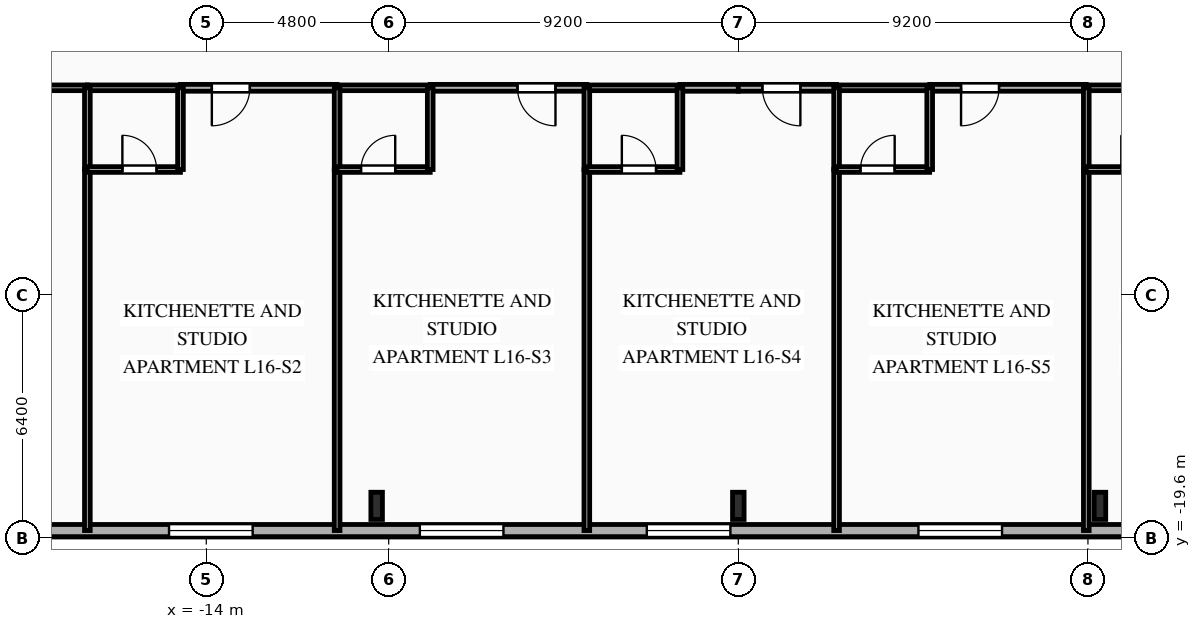
"""IFC4 building model, lengths in metres.
Left out: names, types, materials, properties, quantities, classifications, styles, units other than length and angle.
Written with IfcOpenShell. Run it as: python <this file> out.ifc"""

import sys

from ifc_helpers import new_model, si_unit, direction, frame, frame_2d, origin, origin_2d, place, context, subcontext, project, spatial, rectangle, i_section, extrude, element, fill, save


model = new_model("IFC4")
c1 = context("Model", 3, precision=1e-05, world=origin(), true_north=direction((0.0, 1.0)))
c2 = subcontext(c1, "Body", "Model", "MODEL_VIEW")
j1 = project(units=[si_unit("LENGTHUNIT", "METRE"), si_unit("PLANEANGLEUNIT", "RADIAN")], contexts=[c1])
p1 = place(None, origin())
s1 = spatial("IfcSite", under=j1, at=p1, CompositionType="ELEMENT")
p2 = place(p1, origin())
s2 = spatial("IfcBuilding", under=s1, at=p2, CompositionType="ELEMENT")
p3 = place(p2, frame((0.0, 0.0, 60.5)))
s3 = spatial("IfcBuildingStorey", under=s2, at=p3, CompositionType="ELEMENT", Elevation=60.5)
for number, where, z_axis, x_axis in (
    (1, (-9.517, -18.75, 0.0), (0.0, 0.0, 1.0), (1.0, 0.0, 0.0)),
    (2, (0.0, -18.75, 0.0), (0.0, 0.0, 1.0), (1.0, 0.0, 0.0)),
    (3, (9.517, -18.75, 0.0), (0.0, 0.0, 1.0), (1.0, 0.0, 0.0)),
):
    element("IfcColumn", number, at=place(p3, frame(where, z_axis=z_axis, x_axis=x_axis)), inside=s3, PredefinedType="COLUMN", context=c2, shape_type="SweptSolid", body=[
        extrude(i_section(OverallWidth=0.304, OverallDepth=0.716, WebThickness=0.021, FlangeThickness=0.04, FilletRadius=0.027, at=origin_2d()), origin(), (0.0, 0.0, 1.0), 3.35),
    ])
p4 = place(p3, frame((29.2, -19.4, 0.0), z_axis=(0.0, 0.0, 1.0), x_axis=(-1.0, 0.0, 0.0)))
e4 = element("IfcWall", 4, at=p4, inside=s3, PredefinedType="SOLIDWALL", context=c2, shape_type="SweptSolid", body=[
    extrude(rectangle(XDim=58.4, YDim=0.32, at=frame_2d((29.2, 0.0))), origin(), (0.0, 0.0, 1.0), 3.035),
])
p5 = place(p4, frame((7.215, 0.0, 0.85)))
e5 = element("IfcOpeningElement", 5, at=p5, cuts=e4, PredefinedType="OPENING", context=c2, shape_type="SweptSolid", body=[
    extrude(rectangle(XDim=1.65, YDim=1.85, at=frame_2d((0.825, 0.925))), frame((0.0, 0.17, 0.0), z_axis=(0.0, -1.0, 0.0), x_axis=(1.0, 0.0, 0.0)), (0.0, 0.0, 1.0), 0.34),
])
p6 = place(p4, frame((10.855, 0.0, 0.85)))
e6 = element("IfcOpeningElement", 6, at=p6, cuts=e4, PredefinedType="OPENING", context=c2, shape_type="SweptSolid", body=[
    extrude(rectangle(XDim=1.65, YDim=1.85, at=frame_2d((0.825, 0.925))), frame((0.0, 0.17, 0.0), z_axis=(0.0, -1.0, 0.0), x_axis=(1.0, 0.0, 0.0)), (0.0, 0.0, 1.0), 0.34),
])
p7 = place(p4, frame((15.7, 0.0, 0.85)))
e7 = element("IfcOpeningElement", 7, at=p7, cuts=e4, PredefinedType="OPENING", context=c2, shape_type="SweptSolid", body=[
    extrude(rectangle(XDim=2.2, YDim=1.85, at=frame_2d((1.1, 0.925))), frame((0.0, 0.17, 0.0), z_axis=(0.0, -1.0, 0.0), x_axis=(1.0, 0.0, 0.0)), (0.0, 0.0, 1.0), 0.34),
])
p8 = place(p4, frame((22.26, 0.0, 0.85)))
e8 = element("IfcOpeningElement", 8, at=p8, cuts=e4, PredefinedType="OPENING", context=c2, shape_type="SweptSolid", body=[
    extrude(rectangle(XDim=2.2, YDim=1.85, at=frame_2d((1.1, 0.925))), frame((0.0, 0.17, 0.0), z_axis=(0.0, -1.0, 0.0), x_axis=(1.0, 0.0, 0.0)), (0.0, 0.0, 1.0), 0.34),
])
p9 = place(p4, frame((29.408, 0.0, 0.85)))
e9 = element("IfcOpeningElement", 9, at=p9, cuts=e4, PredefinedType="OPENING", context=c2, shape_type="SweptSolid", body=[
    extrude(rectangle(XDim=2.2, YDim=1.85, at=frame_2d((1.1, 0.925))), frame((0.0, 0.17, 0.0), z_axis=(0.0, -1.0, 0.0), x_axis=(1.0, 0.0, 0.0)), (0.0, 0.0, 1.0), 0.34),
])
p10 = place(p4, frame((35.38, 0.0, 0.85)))
e10 = element("IfcOpeningElement", 10, at=p10, cuts=e4, PredefinedType="OPENING", context=c2, shape_type="SweptSolid", body=[
    extrude(rectangle(XDim=2.2, YDim=1.85, at=frame_2d((1.1, 0.925))), frame((0.0, 0.17, 0.0), z_axis=(0.0, -1.0, 0.0), x_axis=(1.0, 0.0, 0.0)), (0.0, 0.0, 1.0), 0.34),
])
p11 = place(p4, frame((41.98, 0.0, 0.85)))
e11 = element("IfcOpeningElement", 11, at=p11, cuts=e4, PredefinedType="OPENING", context=c2, shape_type="SweptSolid", body=[
    extrude(rectangle(XDim=2.2, YDim=1.85, at=frame_2d((1.1, 0.925))), frame((0.0, 0.17, 0.0), z_axis=(0.0, -1.0, 0.0), x_axis=(1.0, 0.0, 0.0)), (0.0, 0.0, 1.0), 0.34),
])
p12 = place(p4, frame((48.495, 0.0, 0.85)))
e12 = element("IfcOpeningElement", 12, at=p12, cuts=e4, PredefinedType="OPENING", context=c2, shape_type="SweptSolid", body=[
    extrude(rectangle(XDim=1.65, YDim=1.85, at=frame_2d((0.825, 0.925))), frame((0.0, 0.17, 0.0), z_axis=(0.0, -1.0, 0.0), x_axis=(1.0, 0.0, 0.0)), (0.0, 0.0, 1.0), 0.34),
])
p13 = place(p3, frame((-17.129, -7.75, 0.0), z_axis=(0.0, 0.0, 1.0), x_axis=(-1.0, 0.0, 0.0)))
e13 = element("IfcWall", 13, at=p13, inside=s3, PredefinedType="PARTITIONING", context=c2, shape_type="SweptSolid", body=[
    extrude(rectangle(XDim=5.871, YDim=0.15, at=frame_2d((2.936, 0.0))), origin(), (0.0, 0.0, 1.0), 3.035),
])
p14 = place(p13, frame((3.783, 0.0, 0.0)))
e14 = element("IfcOpeningElement", 14, at=p14, cuts=e13, PredefinedType="OPENING", context=c2, shape_type="SweptSolid", body=[
    extrude(rectangle(XDim=1.05, YDim=2.15, at=frame_2d((0.525, 1.075))), frame((0.0, 0.085, 0.0), z_axis=(0.0, -1.0, 0.0), x_axis=(1.0, 0.0, 0.0)), (0.0, 0.0, 1.0), 0.17),
])
p15 = place(p3, frame((-10.557, -7.75, 0.0), z_axis=(0.0, 0.0, 1.0), x_axis=(-1.0, 0.0, 0.0)))
e15 = element("IfcWall", 15, at=p15, inside=s3, PredefinedType="PARTITIONING", context=c2, shape_type="SweptSolid", body=[
    extrude(rectangle(XDim=4.122, YDim=0.18, at=frame_2d((2.061, 0.0))), origin(), (0.0, 0.0, 1.0), 3.035),
])
p16 = place(p15, frame((2.297, 0.0, 0.0)))
e16 = element("IfcOpeningElement", 16, at=p16, cuts=e15, PredefinedType="OPENING", context=c2, shape_type="SweptSolid", body=[
    extrude(rectangle(XDim=1.0, YDim=2.15, at=frame_2d((0.5, 1.075))), frame((0.0, 0.1, 0.0), z_axis=(0.0, -1.0, 0.0), x_axis=(1.0, 0.0, 0.0)), (0.0, 0.0, 1.0), 0.2),
])
p17 = place(p3, frame((-14.679, -7.75, 0.0), z_axis=(0.0, 0.0, 1.0), x_axis=(-1.0, 0.0, 0.0)))
e17 = element("IfcWall", 17, at=p17, inside=s3, PredefinedType="PLUMBINGWALL", context=c2, shape_type="SweptSolid", body=[
    extrude(rectangle(XDim=2.45, YDim=0.15, at=frame_2d((1.225, 0.0))), origin(), (0.0, 0.0, 1.0), 3.035),
])
p18 = place(p3, frame((-3.986, -7.75, 0.0), z_axis=(0.0, 0.0, 1.0), x_axis=(-1.0, 0.0, 0.0)))
e18 = element("IfcWall", 18, at=p18, inside=s3, PredefinedType="PARTITIONING", context=c2, shape_type="SweptSolid", body=[
    extrude(rectangle(XDim=4.121, YDim=0.18, at=frame_2d((2.061, 0.0))), origin(), (0.0, 0.0, 1.0), 3.035),
])
p19 = place(p18, frame((0.825, 0.0, 0.0)))
e19 = element("IfcOpeningElement", 19, at=p19, cuts=e18, PredefinedType="OPENING", context=c2, shape_type="SweptSolid", body=[
    extrude(rectangle(XDim=1.0, YDim=2.15, at=frame_2d((0.5, 1.075))), frame((0.0, 0.1, 0.0), z_axis=(0.0, -1.0, 0.0), x_axis=(1.0, 0.0, 0.0)), (0.0, 0.0, 1.0), 0.2),
])
p20 = place(p3, frame((-8.107, -7.75, 0.0), z_axis=(0.0, 0.0, 1.0), x_axis=(-1.0, 0.0, 0.0)))
e20 = element("IfcWall", 20, at=p20, inside=s3, PredefinedType="PLUMBINGWALL", context=c2, shape_type="SweptSolid", body=[
    extrude(rectangle(XDim=2.45, YDim=0.15, at=frame_2d((1.225, 0.0))), origin(), (0.0, 0.0, 1.0), 3.035),
])
p21 = place(p3, frame((0.0, -7.75, 0.0), z_axis=(0.0, 0.0, 1.0), x_axis=(-1.0, 0.0, 0.0)))
e21 = element("IfcWall", 21, at=p21, inside=s3, PredefinedType="PARTITIONING", context=c2, shape_type="SweptSolid", body=[
    extrude(rectangle(XDim=1.536, YDim=0.18, at=frame_2d((0.768, 0.0))), origin(), (0.0, 0.0, 1.0), 3.035),
])
p22 = place(p3, frame((-1.536, -7.75, 0.0), z_axis=(0.0, 0.0, 1.0), x_axis=(-1.0, 0.0, 0.0)))
e22 = element("IfcWall", 22, at=p22, inside=s3, PredefinedType="PLUMBINGWALL", context=c2, shape_type="SweptSolid", body=[
    extrude(rectangle(XDim=2.45, YDim=0.15, at=frame_2d((1.225, 0.0))), origin(), (0.0, 0.0, 1.0), 3.035),
])
p23 = place(p3, frame((2.586, -7.75, 0.0), z_axis=(0.0, 0.0, 1.0), x_axis=(-1.0, 0.0, 0.0)))
e23 = element("IfcWall", 23, at=p23, inside=s3, PredefinedType="PARTITIONING", context=c2, shape_type="SweptSolid", body=[
    extrude(rectangle(XDim=2.586, YDim=0.18, at=frame_2d((1.293, 0.0))), origin(), (0.0, 0.0, 1.0), 3.035),
])
p24 = place(p23, frame((0.953, 0.0, 0.0)))
e24 = element("IfcOpeningElement", 24, at=p24, cuts=e23, PredefinedType="OPENING", context=c2, shape_type="SweptSolid", body=[
    extrude(rectangle(XDim=1.0, YDim=2.15, at=frame_2d((0.5, 1.075))), frame((0.0, 0.1, 0.0), z_axis=(0.0, -1.0, 0.0), x_axis=(1.0, 0.0, 0.0)), (0.0, 0.0, 1.0), 0.2),
])
p25 = place(p3, frame((9.157, -7.75, 0.0), z_axis=(0.0, 0.0, 1.0), x_axis=(-1.0, 0.0, 0.0)))
e25 = element("IfcWall", 25, at=p25, inside=s3, PredefinedType="PARTITIONING", context=c2, shape_type="SweptSolid", body=[
    extrude(rectangle(XDim=4.121, YDim=0.18, at=frame_2d((2.061, 0.0))), origin(), (0.0, 0.0, 1.0), 3.035),
])
p26 = place(p25, frame((2.296, 0.0, 0.0)))
e26 = element("IfcOpeningElement", 26, at=p26, cuts=e25, PredefinedType="OPENING", context=c2, shape_type="SweptSolid", body=[
    extrude(rectangle(XDim=1.0, YDim=2.15, at=frame_2d((0.5, 1.075))), frame((0.0, 0.1, 0.0), z_axis=(0.0, -1.0, 0.0), x_axis=(1.0, 0.0, 0.0)), (0.0, 0.0, 1.0), 0.2),
])
for number, where, z_axis, x_axis in (
    (27, (5.036, -7.75, 0.0), (0.0, 0.0, 1.0), (-1.0, 0.0, 0.0)),
    (28, (11.607, -7.75, 0.0), (0.0, 0.0, 1.0), (-1.0, 0.0, 0.0)),
):
    element("IfcWall", number, at=place(p3, frame(where, z_axis=z_axis, x_axis=x_axis)), inside=s3, PredefinedType="PLUMBINGWALL", context=c2, shape_type="SweptSolid", body=[
        extrude(rectangle(XDim=2.45, YDim=0.15, at=frame_2d((1.225, 0.0))), origin(), (0.0, 0.0, 1.0), 3.035),
    ])
p27 = place(p3, frame((-17.129, -9.9, 0.0), z_axis=(0.0, 0.0, 1.0), x_axis=(0.0, -1.0, 0.0)))
e29 = element("IfcWall", 29, at=p27, inside=s3, PredefinedType="PARTITIONING", context=c2, shape_type="SweptSolid", body=[
    extrude(rectangle(XDim=9.5, YDim=0.15, at=frame_2d((4.75, 0.0))), origin(), (0.0, 0.0, 1.0), 3.035),
])
p28 = place(p3, frame((-17.129, -7.75, 0.0), z_axis=(0.0, 0.0, 1.0), x_axis=(0.0, -1.0, 0.0)))
e30 = element("IfcWall", 30, at=p28, inside=s3, PredefinedType="PLUMBINGWALL", context=c2, shape_type="SweptSolid", body=[
    extrude(rectangle(XDim=2.15, YDim=0.15, at=frame_2d((1.075, 0.0))), origin(), (0.0, 0.0, 1.0), 3.035),
])
p29 = place(p3, frame((-17.129, -9.9, 0.0), z_axis=(0.0, 0.0, 1.0), x_axis=(1.0, 0.0, 0.0)))
e31 = element("IfcWall", 31, at=p29, inside=s3, PredefinedType="PLUMBINGWALL", context=c2, shape_type="SweptSolid", body=[
    extrude(rectangle(XDim=2.45, YDim=0.15, at=frame_2d((1.225, 0.0))), origin(), (0.0, 0.0, 1.0), 3.035),
])
p30 = place(p29, frame((0.921, 0.0, 0.0)))
e32 = element("IfcOpeningElement", 32, at=p30, cuts=e31, PredefinedType="OPENING", context=c2, shape_type="SweptSolid", body=[
    extrude(rectangle(XDim=0.9, YDim=2.1, at=frame_2d((0.45, 1.05))), frame((0.0, 0.085, 0.0), z_axis=(0.0, -1.0, 0.0), x_axis=(1.0, 0.0, 0.0)), (0.0, 0.0, 1.0), 0.17),
])
p31 = place(p3, frame((-14.679, -9.9, 0.0), z_axis=(0.0, 0.0, 1.0), x_axis=(0.0, 1.0, 0.0)))
e33 = element("IfcWall", 33, at=p31, inside=s3, PredefinedType="PLUMBINGWALL", context=c2, shape_type="SweptSolid", body=[
    extrude(rectangle(XDim=2.15, YDim=0.15, at=frame_2d((1.075, 0.0))), origin(), (0.0, 0.0, 1.0), 3.035),
])
p32 = place(p3, frame((-10.557, -9.9, 0.0), z_axis=(0.0, 0.0, 1.0), x_axis=(0.0, -1.0, 0.0)))
e34 = element("IfcWall", 34, at=p32, inside=s3, PredefinedType="PARTITIONING", context=c2, shape_type="SweptSolid", body=[
    extrude(rectangle(XDim=9.5, YDim=0.15, at=frame_2d((4.75, 0.0))), origin(), (0.0, 0.0, 1.0), 3.035),
])
p33 = place(p3, frame((-10.557, -7.75, 0.0), z_axis=(0.0, 0.0, 1.0), x_axis=(0.0, -1.0, 0.0)))
e35 = element("IfcWall", 35, at=p33, inside=s3, PredefinedType="PLUMBINGWALL", context=c2, shape_type="SweptSolid", body=[
    extrude(rectangle(XDim=2.15, YDim=0.15, at=frame_2d((1.075, 0.0))), origin(), (0.0, 0.0, 1.0), 3.035),
])
p34 = place(p3, frame((-10.557, -9.9, 0.0), z_axis=(0.0, 0.0, 1.0), x_axis=(1.0, 0.0, 0.0)))
e36 = element("IfcWall", 36, at=p34, inside=s3, PredefinedType="PLUMBINGWALL", context=c2, shape_type="SweptSolid", body=[
    extrude(rectangle(XDim=2.45, YDim=0.15, at=frame_2d((1.225, 0.0))), origin(), (0.0, 0.0, 1.0), 3.035),
])
p35 = place(p34, frame((0.629, 0.0, 0.0)))
e37 = element("IfcOpeningElement", 37, at=p35, cuts=e36, PredefinedType="OPENING", context=c2, shape_type="SweptSolid", body=[
    extrude(rectangle(XDim=0.9, YDim=2.1, at=frame_2d((0.45, 1.05))), frame((0.0, 0.085, 0.0), z_axis=(0.0, -1.0, 0.0), x_axis=(1.0, 0.0, 0.0)), (0.0, 0.0, 1.0), 0.17),
])
p36 = place(p3, frame((-8.107, -9.9, 0.0), z_axis=(0.0, 0.0, 1.0), x_axis=(0.0, 1.0, 0.0)))
e38 = element("IfcWall", 38, at=p36, inside=s3, PredefinedType="PLUMBINGWALL", context=c2, shape_type="SweptSolid", body=[
    extrude(rectangle(XDim=2.15, YDim=0.15, at=frame_2d((1.075, 0.0))), origin(), (0.0, 0.0, 1.0), 3.035),
])
p37 = place(p3, frame((-3.986, -9.9, 0.0), z_axis=(0.0, 0.0, 1.0), x_axis=(0.0, -1.0, 0.0)))
e39 = element("IfcWall", 39, at=p37, inside=s3, PredefinedType="PARTITIONING", context=c2, shape_type="SweptSolid", body=[
    extrude(rectangle(XDim=9.5, YDim=0.15, at=frame_2d((4.75, 0.0))), origin(), (0.0, 0.0, 1.0), 3.035),
])
p38 = place(p3, frame((-3.986, -7.75, 0.0), z_axis=(0.0, 0.0, 1.0), x_axis=(0.0, -1.0, 0.0)))
e40 = element("IfcWall", 40, at=p38, inside=s3, PredefinedType="PLUMBINGWALL", context=c2, shape_type="SweptSolid", body=[
    extrude(rectangle(XDim=2.15, YDim=0.15, at=frame_2d((1.075, 0.0))), origin(), (0.0, 0.0, 1.0), 3.035),
])
p39 = place(p3, frame((-3.986, -9.9, 0.0), z_axis=(0.0, 0.0, 1.0), x_axis=(1.0, 0.0, 0.0)))
e41 = element("IfcWall", 41, at=p39, inside=s3, PredefinedType="PLUMBINGWALL", context=c2, shape_type="SweptSolid", body=[
    extrude(rectangle(XDim=2.45, YDim=0.15, at=frame_2d((1.225, 0.0))), origin(), (0.0, 0.0, 1.0), 3.035),
])
p40 = place(p39, frame((0.921, 0.0, 0.0)))
e42 = element("IfcOpeningElement", 42, at=p40, cuts=e41, PredefinedType="OPENING", context=c2, shape_type="SweptSolid", body=[
    extrude(rectangle(XDim=0.9, YDim=2.1, at=frame_2d((0.45, 1.05))), frame((0.0, 0.085, 0.0), z_axis=(0.0, -1.0, 0.0), x_axis=(1.0, 0.0, 0.0)), (0.0, 0.0, 1.0), 0.17),
])
p41 = place(p3, frame((-1.536, -9.9, 0.0), z_axis=(0.0, 0.0, 1.0), x_axis=(0.0, 1.0, 0.0)))
e43 = element("IfcWall", 43, at=p41, inside=s3, PredefinedType="PLUMBINGWALL", context=c2, shape_type="SweptSolid", body=[
    extrude(rectangle(XDim=2.15, YDim=0.15, at=frame_2d((1.075, 0.0))), origin(), (0.0, 0.0, 1.0), 3.035),
])
p42 = place(p3, frame((2.586, -9.9, 0.0), z_axis=(0.0, 0.0, 1.0), x_axis=(0.0, -1.0, 0.0)))
e44 = element("IfcWall", 44, at=p42, inside=s3, PredefinedType="PARTITIONING", context=c2, shape_type="SweptSolid", body=[
    extrude(rectangle(XDim=9.5, YDim=0.15, at=frame_2d((4.75, 0.0))), origin(), (0.0, 0.0, 1.0), 3.035),
])
p43 = place(p3, frame((2.586, -7.75, 0.0), z_axis=(0.0, 0.0, 1.0), x_axis=(0.0, -1.0, 0.0)))
e45 = element("IfcWall", 45, at=p43, inside=s3, PredefinedType="PLUMBINGWALL", context=c2, shape_type="SweptSolid", body=[
    extrude(rectangle(XDim=2.15, YDim=0.15, at=frame_2d((1.075, 0.0))), origin(), (0.0, 0.0, 1.0), 3.035),
])
p44 = place(p3, frame((2.586, -9.9, 0.0), z_axis=(0.0, 0.0, 1.0), x_axis=(1.0, 0.0, 0.0)))
e46 = element("IfcWall", 46, at=p44, inside=s3, PredefinedType="PLUMBINGWALL", context=c2, shape_type="SweptSolid", body=[
    extrude(rectangle(XDim=2.45, YDim=0.15, at=frame_2d((1.225, 0.0))), origin(), (0.0, 0.0, 1.0), 3.035),
])
p45 = place(p44, frame((0.629, 0.0, 0.0)))
e47 = element("IfcOpeningElement", 47, at=p45, cuts=e46, PredefinedType="OPENING", context=c2, shape_type="SweptSolid", body=[
    extrude(rectangle(XDim=0.9, YDim=2.1, at=frame_2d((0.45, 1.05))), frame((0.0, 0.085, 0.0), z_axis=(0.0, -1.0, 0.0), x_axis=(1.0, 0.0, 0.0)), (0.0, 0.0, 1.0), 0.17),
])
p46 = place(p3, frame((5.036, -9.9, 0.0), z_axis=(0.0, 0.0, 1.0), x_axis=(0.0, 1.0, 0.0)))
e48 = element("IfcWall", 48, at=p46, inside=s3, PredefinedType="PLUMBINGWALL", context=c2, shape_type="SweptSolid", body=[
    extrude(rectangle(XDim=2.15, YDim=0.15, at=frame_2d((1.075, 0.0))), origin(), (0.0, 0.0, 1.0), 3.035),
])
p47 = place(p3, frame((9.157, -9.9, 0.0), z_axis=(0.0, 0.0, 1.0), x_axis=(0.0, -1.0, 0.0)))
e49 = element("IfcWall", 49, at=p47, inside=s3, PredefinedType="PARTITIONING", context=c2, shape_type="SweptSolid", body=[
    extrude(rectangle(XDim=9.5, YDim=0.15, at=frame_2d((4.75, 0.0))), origin(), (0.0, 0.0, 1.0), 2.52),
])
p48 = place(p3, frame((9.157, -7.75, 0.0), z_axis=(0.0, 0.0, 1.0), x_axis=(0.0, -1.0, 0.0)))
e50 = element("IfcWall", 50, at=p48, inside=s3, PredefinedType="PLUMBINGWALL", context=c2, shape_type="SweptSolid", body=[
    extrude(rectangle(XDim=2.15, YDim=0.15, at=frame_2d((1.075, 0.0))), origin(), (0.0, 0.0, 1.0), 2.52),
])
p49 = place(p3, frame((9.157, -9.9, 0.0), z_axis=(0.0, 0.0, 1.0), x_axis=(1.0, 0.0, 0.0)))
e51 = element("IfcWall", 51, at=p49, inside=s3, PredefinedType="PLUMBINGWALL", context=c2, shape_type="SweptSolid", body=[
    extrude(rectangle(XDim=2.45, YDim=0.15, at=frame_2d((1.225, 0.0))), origin(), (0.0, 0.0, 1.0), 3.035),
])
p50 = place(p49, frame((0.921, 0.0, 0.0)))
e52 = element("IfcOpeningElement", 52, at=p50, cuts=e51, PredefinedType="OPENING", context=c2, shape_type="SweptSolid", body=[
    extrude(rectangle(XDim=0.9, YDim=2.1, at=frame_2d((0.45, 1.05))), frame((0.0, 0.085, 0.0), z_axis=(0.0, -1.0, 0.0), x_axis=(1.0, 0.0, 0.0)), (0.0, 0.0, 1.0), 0.17),
])
p51 = place(p8, origin())
e53 = element("IfcWindow", 53, at=p51, inside=s3, PartitioningType="SINGLE_PANEL", PredefinedType="WINDOW", context=c2, shape_type="SweptSolid", body=[
    extrude(rectangle(XDim=2.2, YDim=1.85, at=frame_2d((1.1, 0.925))), frame((0.0, 0.03, 0.0), z_axis=(0.0, -1.0, 0.0), x_axis=(1.0, 0.0, 0.0)), (0.0, 0.0, 1.0), 0.06),
])
fill(e8, e53)
p52 = place(p9, origin())
e54 = element("IfcWindow", 54, at=p52, inside=s3, PartitioningType="SINGLE_PANEL", PredefinedType="WINDOW", context=c2, shape_type="SweptSolid", body=[
    extrude(rectangle(XDim=2.2, YDim=1.85, at=frame_2d((1.1, 0.925))), frame((0.0, 0.03, 0.0), z_axis=(0.0, -1.0, 0.0), x_axis=(1.0, 0.0, 0.0)), (0.0, 0.0, 1.0), 0.06),
])
fill(e9, e54)
p53 = place(p10, origin())
e55 = element("IfcWindow", 55, at=p53, inside=s3, PartitioningType="SINGLE_PANEL", PredefinedType="WINDOW", context=c2, shape_type="SweptSolid", body=[
    extrude(rectangle(XDim=2.2, YDim=1.85, at=frame_2d((1.1, 0.925))), frame((0.0, 0.03, 0.0), z_axis=(0.0, -1.0, 0.0), x_axis=(1.0, 0.0, 0.0)), (0.0, 0.0, 1.0), 0.06),
])
fill(e10, e55)
p54 = place(p11, origin())
e56 = element("IfcWindow", 56, at=p54, inside=s3, PartitioningType="SINGLE_PANEL", PredefinedType="WINDOW", context=c2, shape_type="SweptSolid", body=[
    extrude(rectangle(XDim=2.2, YDim=1.85, at=frame_2d((1.1, 0.925))), frame((0.0, 0.03, 0.0), z_axis=(0.0, -1.0, 0.0), x_axis=(1.0, 0.0, 0.0)), (0.0, 0.0, 1.0), 0.06),
])
fill(e11, e56)
p55 = place(p16, origin())
e57 = element("IfcDoor", 57, at=p55, inside=s3, OperationType="SINGLE_SWING_RIGHT", PredefinedType="DOOR", context=c2, shape_type="SweptSolid", body=[
    extrude(rectangle(XDim=1.0, YDim=2.15, at=frame_2d((0.5, 1.075))), frame((0.0, 0.025, 0.0), z_axis=(0.0, -1.0, 0.0), x_axis=(1.0, 0.0, 0.0)), (0.0, 0.0, 1.0), 0.05),
])
fill(e16, e57)
p56 = place(p19, origin())
e58 = element("IfcDoor", 58, at=p56, inside=s3, OperationType="SINGLE_SWING_LEFT", PredefinedType="DOOR", context=c2, shape_type="SweptSolid", body=[
    extrude(rectangle(XDim=1.0, YDim=2.15, at=frame_2d((0.5, 1.075))), frame((0.0, 0.025, 0.0), z_axis=(0.0, -1.0, 0.0), x_axis=(1.0, 0.0, 0.0)), (0.0, 0.0, 1.0), 0.05),
])
fill(e19, e58)
p57 = place(p24, origin())
e59 = element("IfcDoor", 59, at=p57, inside=s3, OperationType="SINGLE_SWING_LEFT", PredefinedType="DOOR", context=c2, shape_type="SweptSolid", body=[
    extrude(rectangle(XDim=1.0, YDim=2.15, at=frame_2d((0.5, 1.075))), frame((0.0, 0.025, 0.0), z_axis=(0.0, -1.0, 0.0), x_axis=(1.0, 0.0, 0.0)), (0.0, 0.0, 1.0), 0.05),
])
fill(e24, e59)
p58 = place(p26, origin())
e60 = element("IfcDoor", 60, at=p58, inside=s3, OperationType="SINGLE_SWING_RIGHT", PredefinedType="DOOR", context=c2, shape_type="SweptSolid", body=[
    extrude(rectangle(XDim=1.0, YDim=2.15, at=frame_2d((0.5, 1.075))), frame((0.0, 0.025, 0.0), z_axis=(0.0, -1.0, 0.0), x_axis=(1.0, 0.0, 0.0)), (0.0, 0.0, 1.0), 0.05),
])
fill(e26, e60)
p59 = place(p30, origin())
e61 = element("IfcDoor", 61, at=p59, inside=s3, OperationType="SINGLE_SWING_LEFT", PredefinedType="DOOR", context=c2, shape_type="SweptSolid", body=[
    extrude(rectangle(XDim=0.9, YDim=2.1, at=frame_2d((0.45, 1.05))), frame((0.0, 0.025, 0.0), z_axis=(0.0, -1.0, 0.0), x_axis=(1.0, 0.0, 0.0)), (0.0, 0.0, 1.0), 0.05),
])
fill(e32, e61)
p60 = place(p35, origin())
e62 = element("IfcDoor", 62, at=p60, inside=s3, OperationType="SINGLE_SWING_RIGHT", PredefinedType="DOOR", context=c2, shape_type="SweptSolid", body=[
    extrude(rectangle(XDim=0.9, YDim=2.1, at=frame_2d((0.45, 1.05))), frame((0.0, 0.025, 0.0), z_axis=(0.0, -1.0, 0.0), x_axis=(1.0, 0.0, 0.0)), (0.0, 0.0, 1.0), 0.05),
])
fill(e37, e62)
p61 = place(p40, origin())
e63 = element("IfcDoor", 63, at=p61, inside=s3, OperationType="SINGLE_SWING_LEFT", PredefinedType="DOOR", context=c2, shape_type="SweptSolid", body=[
    extrude(rectangle(XDim=0.9, YDim=2.1, at=frame_2d((0.45, 1.05))), frame((0.0, 0.025, 0.0), z_axis=(0.0, -1.0, 0.0), x_axis=(1.0, 0.0, 0.0)), (0.0, 0.0, 1.0), 0.05),
])
fill(e42, e63)
p62 = place(p45, origin())
e64 = element("IfcDoor", 64, at=p62, inside=s3, OperationType="SINGLE_SWING_RIGHT", PredefinedType="DOOR", context=c2, shape_type="SweptSolid", body=[
    extrude(rectangle(XDim=0.9, YDim=2.1, at=frame_2d((0.45, 1.05))), frame((0.0, 0.025, 0.0), z_axis=(0.0, -1.0, 0.0), x_axis=(1.0, 0.0, 0.0)), (0.0, 0.0, 1.0), 0.05),
])
fill(e47, e64)
p63 = place(p50, origin())
e65 = element("IfcDoor", 65, at=p63, inside=s3, OperationType="SINGLE_SWING_LEFT", PredefinedType="DOOR", context=c2, shape_type="SweptSolid", body=[
    extrude(rectangle(XDim=0.9, YDim=2.1, at=frame_2d((0.45, 1.05))), frame((0.0, 0.025, 0.0), z_axis=(0.0, -1.0, 0.0), x_axis=(1.0, 0.0, 0.0)), (0.0, 0.0, 1.0), 0.05),
])
fill(e52, e65)
save(model, sys.argv[1])
